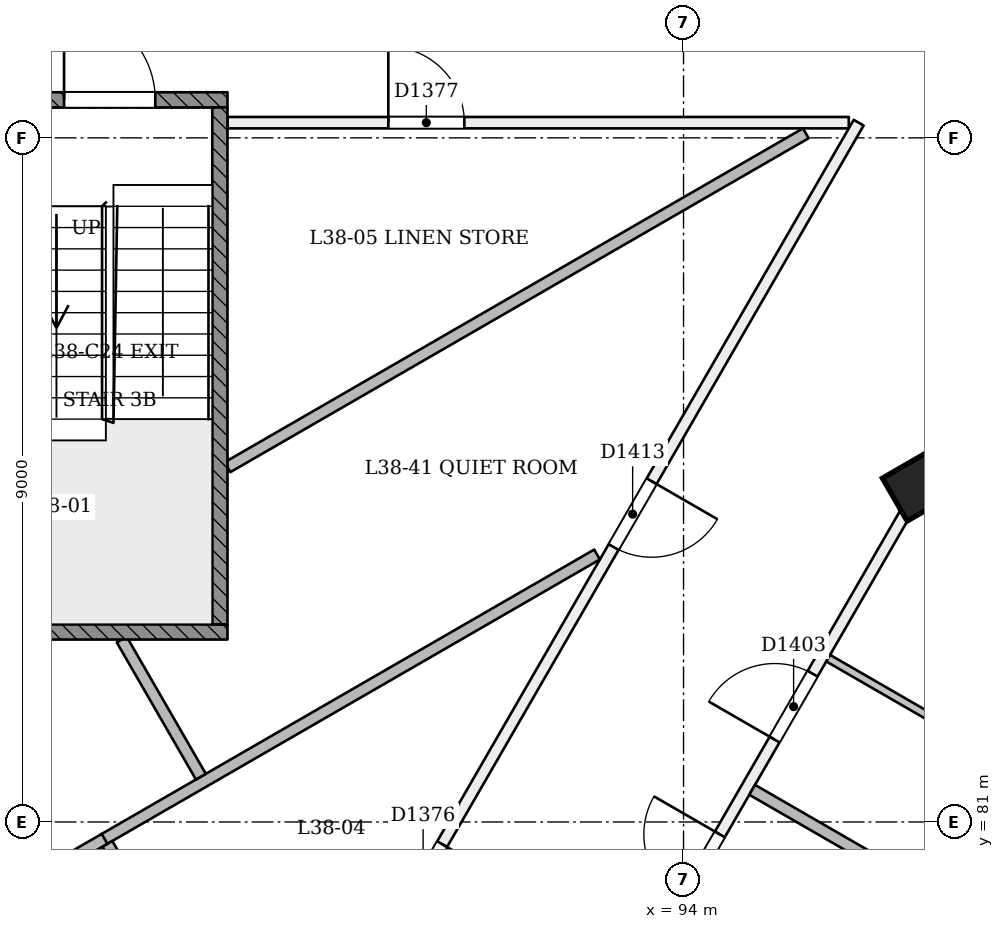
"""IFC4 building model, lengths in metres.
Left out: names, types, materials, properties, quantities, classifications, styles, units other than length and angle.
Written with IfcOpenShell. Run it as: python <this file> out.ifc"""

import sys

from ifc_helpers import new_model, si_unit, direction, frame, frame_2d, origin, origin_2d, place, context, subcontext, project, spatial, rectangle, extrude, element, fill, save


model = new_model("IFC4")
c1 = context("Model", 3, precision=1e-05, world=origin(), true_north=direction((0.0, 1.0)))
c2 = subcontext(c1, "Body", "Model", "MODEL_VIEW")
j1 = project(units=[si_unit("LENGTHUNIT", "METRE"), si_unit("PLANEANGLEUNIT", "RADIAN")], contexts=[c1])
p1 = place(None, origin())
s1 = spatial("IfcSite", under=j1, at=p1, CompositionType="ELEMENT")
p2 = place(p1, origin())
s2 = spatial("IfcBuilding", under=s1, at=p2, CompositionType="ELEMENT")
p3 = place(p2, frame((0.0, 0.0, 149.4)))
s3 = spatial("IfcBuildingStorey", under=s2, at=p3, CompositionType="ELEMENT", Elevation=149.4)
p4 = place(p3, frame((97.088, 85.357, -0.02), z_axis=(-0.022222910879, 0.038415824599, 0.999014697916), x_axis=(-0.499510298922, -0.86602370152, 0.022190305915)))
e1 = element("IfcColumn", 1, at=p4, inside=s3, PredefinedType="COLUMN", context=c2, shape_type="SweptSolid", body=[
    extrude(rectangle(XDim=0.65, YDim=0.65, at=origin_2d()), origin(), (0.0, 0.0, 1.0), 3.604),
])
p5 = place(p3, frame((88.0, 90.2, 0.0), z_axis=(0.0, 0.0, 1.0), x_axis=(1.0, 0.0, 0.0)))
e2 = element("IfcWall", 2, at=p5, inside=s3, PredefinedType="PARTITIONING", context=c2, shape_type="SweptSolid", body=[
    extrude(rectangle(XDim=8.174, YDim=0.15, at=frame_2d((4.087, 0.0))), origin(), (0.0, 0.0, 1.0), 3.15),
])
p6 = place(p5, frame((2.116, 0.0, 0.0)))
e3 = element("IfcOpeningElement", 3, at=p6, cuts=e2, PredefinedType="OPENING", context=c2, shape_type="SweptSolid", body=[
    extrude(rectangle(XDim=1.0, YDim=2.1, at=frame_2d((0.5, 1.05))), frame((0.0, 0.085, 0.0), z_axis=(0.0, -1.0, 0.0), x_axis=(1.0, 0.0, 0.0)), (0.0, 0.0, 1.0), 0.171),
])
p7 = place(p3, frame((96.304, 90.2, 0.0), z_axis=(0.0, 0.0, 1.0), x_axis=(-0.500004509943, -0.866022799952, 0.0)))
e4 = element("IfcWall", 4, at=p7, inside=s3, PredefinedType="PARTITIONING", context=c2, shape_type="SweptSolid", body=[
    extrude(rectangle(XDim=22.478, YDim=0.15, at=frame_2d((11.239, 0.0))), origin(), (0.0, 0.0, 1.0), 3.15),
])
p8 = place(p7, frame((10.96, 0.0, 0.0)))
e5 = element("IfcOpeningElement", 5, at=p8, cuts=e4, PredefinedType="OPENING", context=c2, shape_type="SweptSolid", body=[
    extrude(rectangle(XDim=1.0, YDim=2.1, at=frame_2d((0.5, 1.05))), frame((0.0, 0.085, 0.0), z_axis=(0.0, -1.0, 0.0), x_axis=(1.0, 0.0, 0.0)), (0.0, 0.0, 1.0), 0.171),
])
p9 = place(p7, frame((5.447, 0.0, 0.0)))
e6 = element("IfcOpeningElement", 6, at=p9, cuts=e4, PredefinedType="OPENING", context=c2, shape_type="SweptSolid", body=[
    extrude(rectangle(XDim=1.0, YDim=2.1, at=frame_2d((0.5, 1.05))), frame((0.0, 0.085, 0.0), z_axis=(0.0, -1.0, 0.0), x_axis=(1.0, 0.0, 0.0)), (0.0, 0.0, 1.0), 0.171),
])
p10 = place(p3, frame((85.065, 64.534, 0.0), z_axis=(0.0, 0.0, 1.0), x_axis=(0.500002644497, 0.866023876978, 0.0)))
e7 = element("IfcWall", 7, at=p10, inside=s3, PredefinedType="PARTITIONING", context=c2, shape_type="SweptSolid", body=[
    extrude(rectangle(XDim=39.221, YDim=0.15, at=frame_2d((19.61, 0.0))), origin(), (0.0, 0.0, 1.0), 2.75),
])
p11 = place(p10, frame((0.506, 0.0, 0.0)))
e8 = element("IfcOpeningElement", 8, at=p11, cuts=e7, PredefinedType="OPENING", context=c2, shape_type="SweptSolid", body=[
    extrude(rectangle(XDim=1.2, YDim=2.1, at=frame_2d((0.6, 1.05))), frame((0.0, 0.085, 0.0), z_axis=(0.0, -1.0, 0.0), x_axis=(1.0, 0.0, 0.0)), (0.0, 0.0, 1.0), 0.171),
])
p12 = place(p10, frame((8.825, 0.0, 0.0)))
e9 = element("IfcOpeningElement", 9, at=p12, cuts=e7, PredefinedType="OPENING", context=c2, shape_type="SweptSolid", body=[
    extrude(rectangle(XDim=1.0, YDim=2.1, at=frame_2d((0.5, 1.05))), frame((0.0, 0.085, 0.0), z_axis=(0.0, -1.0, 0.0), x_axis=(1.0, 0.0, 0.0)), (0.0, 0.0, 1.0), 0.171),
])
p13 = place(p10, frame((11.266, 0.0, 0.0)))
e10 = element("IfcOpeningElement", 10, at=p13, cuts=e7, PredefinedType="OPENING", context=c2, shape_type="SweptSolid", body=[
    extrude(rectangle(XDim=1.0, YDim=2.1, at=frame_2d((0.5, 1.05))), frame((0.0, 0.085, 0.0), z_axis=(0.0, -1.0, 0.0), x_axis=(1.0, 0.0, 0.0)), (0.0, 0.0, 1.0), 0.171),
])
p14 = place(p10, frame((17.825, 0.0, 0.0)))
e11 = element("IfcOpeningElement", 11, at=p14, cuts=e7, PredefinedType="OPENING", context=c2, shape_type="SweptSolid", body=[
    extrude(rectangle(XDim=1.0, YDim=2.1, at=frame_2d((0.5, 1.05))), frame((0.0, 0.085, 0.0), z_axis=(0.0, -1.0, 0.0), x_axis=(1.0, 0.0, 0.0)), (0.0, 0.0, 1.0), 0.171),
])
p15 = place(p10, frame((20.266, 0.0, 0.0)))
e12 = element("IfcOpeningElement", 12, at=p15, cuts=e7, PredefinedType="OPENING", context=c2, shape_type="SweptSolid", body=[
    extrude(rectangle(XDim=1.0, YDim=2.1, at=frame_2d((0.5, 1.05))), frame((0.0, 0.085, 0.0), z_axis=(0.0, -1.0, 0.0), x_axis=(1.0, 0.0, 0.0)), (0.0, 0.0, 1.0), 0.171),
])
p16 = place(p10, frame((26.825, 0.0, 0.0)))
e13 = element("IfcOpeningElement", 13, at=p16, cuts=e7, PredefinedType="OPENING", context=c2, shape_type="SweptSolid", body=[
    extrude(rectangle(XDim=1.0, YDim=2.1, at=frame_2d((0.5, 1.05))), frame((0.0, 0.085, 0.0), z_axis=(0.0, -1.0, 0.0), x_axis=(1.0, 0.0, 0.0)), (0.0, 0.0, 1.0), 0.171),
])
p17 = place(p10, frame((30.296, 0.0, 0.0)))
e14 = element("IfcOpeningElement", 14, at=p17, cuts=e7, PredefinedType="OPENING", context=c2, shape_type="SweptSolid", body=[
    extrude(rectangle(XDim=1.0, YDim=2.1, at=frame_2d((0.5, 1.05))), frame((0.0, 0.085, 0.0), z_axis=(0.0, -1.0, 0.0), x_axis=(1.0, 0.0, 0.0)), (0.0, 0.0, 1.0), 0.171),
])
p18 = place(p10, frame((35.875, 0.0, 0.0)))
e15 = element("IfcOpeningElement", 15, at=p18, cuts=e7, PredefinedType="OPENING", context=c2, shape_type="SweptSolid", body=[
    extrude(rectangle(XDim=1.1, YDim=2.1, at=frame_2d((0.55, 1.05))), frame((0.0, 0.085, 0.0), z_axis=(0.0, -1.0, 0.0), x_axis=(1.0, 0.0, 0.0)), (0.0, 0.0, 1.0), 0.171),
])
p19 = place(p10, frame((37.821, 0.0, 0.0)))
e16 = element("IfcOpeningElement", 16, at=p19, cuts=e7, PredefinedType="OPENING", context=c2, shape_type="SweptSolid", body=[
    extrude(rectangle(XDim=1.2, YDim=2.1, at=frame_2d((0.6, 1.05))), frame((0.0, 0.085, 0.0), z_axis=(0.0, -1.0, 0.0), x_axis=(1.0, 0.0, 0.0)), (0.0, 0.0, 1.0), 0.171),
])
p20 = place(p3, frame((92.862, 84.519, 0.0), z_axis=(0.0, 0.0, 1.0), x_axis=(-0.866023543838, -0.500003221507, 0.0)))
e17 = element("IfcWall", 17, at=p20, inside=s3, PredefinedType="PARTITIONING", context=c2, shape_type="SweptSolid", body=[
    extrude(rectangle(XDim=7.502, YDim=0.15, at=frame_2d((3.751, 0.0))), origin(), (0.0, 0.0, 1.0), 3.15),
])
p21 = place(p3, frame((86.42, 80.713, 0.0), z_axis=(0.0, 0.0, 1.0), x_axis=(0.500010613097, -0.866019276224, 0.0)))
e18 = element("IfcWall", 18, at=p21, inside=s3, PredefinedType="PARTITIONING", context=c2, shape_type="SweptSolid", body=[
    extrude(rectangle(XDim=3.276, YDim=0.15, at=frame_2d((1.638, 0.0))), origin(), (0.0, 0.0, 1.0), 3.15),
])
p22 = place(p3, frame((88.0, 85.667, 0.0), z_axis=(0.0, 0.0, 1.0), x_axis=(0.86602686142, 0.499997475293, 0.0)))
e19 = element("IfcWall", 19, at=p22, inside=s3, PredefinedType="PARTITIONING", context=c2, shape_type="SweptSolid", body=[
    extrude(rectangle(XDim=8.786, YDim=0.15, at=frame_2d((4.393, 0.0))), origin(), (0.0, 0.0, 1.0), 3.15),
])
p23 = place(p3, frame((100.398, 78.25, 0.0), z_axis=(0.0, 0.0, 1.0), x_axis=(-0.866025401434, 0.500000004071, 0.0)))
e20 = element("IfcWall", 20, at=p23, inside=s3, PredefinedType="PARTITIONING", context=c2, shape_type="SweptSolid", body=[
    extrude(rectangle(XDim=6.345, YDim=0.15, at=frame_2d((3.173, 0.0))), origin(), (0.0, 0.0, 1.0), 2.65),
])
p24 = place(p3, frame((98.349, 81.743, 0.0), z_axis=(0.0, 0.0, 1.0), x_axis=(-0.866048868473, 0.499959355765, 0.0)))
e21 = element("IfcWall", 21, at=p24, inside=s3, PredefinedType="PARTITIONING", context=c2, shape_type="SweptSolid", body=[
    extrude(rectangle(XDim=2.825, YDim=0.1, at=frame_2d((1.413, 0.0))), origin(), (0.0, 0.0, 1.0), 3.15),
])
p25 = place(p3, frame((99.556, 83.933, 0.0), z_axis=(0.0, 0.0, 1.0), x_axis=(-0.866042014628, 0.499971228071, 0.0)))
e22 = element("IfcWall", 22, at=p25, inside=s3, PredefinedType="PARTITIONING", context=c2, shape_type="SweptSolid", body=[
    extrude(rectangle(XDim=2.775, YDim=0.1, at=frame_2d((1.388, 0.0))), origin(), (0.0, 0.0, 1.0), 2.75),
])
p26 = place(p3, frame((86.609, 83.4, 0.0), z_axis=(0.0, 0.0, 1.0), x_axis=(0.499996383721, -0.866027491634, 0.0)))
e23 = element("IfcWall", 23, at=p26, inside=s3, PredefinedType="PARTITIONING", context=c2, shape_type="SweptSolid", body=[
    extrude(rectangle(XDim=2.083, YDim=0.15, at=frame_2d((1.042, 0.0))), origin(), (0.0, 0.0, 1.0), 3.15),
])
p27 = place(p3, frame((81.013, 77.677, 0.0), z_axis=(0.0, 0.0, 1.0), x_axis=(0.866022320763, 0.500005339912, 0.0)))
e24 = element("IfcWall", 24, at=p27, inside=s3, PredefinedType="PARTITIONING", context=c2, shape_type="SweptSolid", body=[
    extrude(rectangle(XDim=6.201, YDim=0.15, at=frame_2d((3.1, 0.0))), origin(), (0.0, 0.0, 1.0), 3.15),
])
p28 = place(p3, frame((82.0, 90.5, 0.0), z_axis=(0.0, 0.0, 1.0), x_axis=(1.0, 0.0, 0.0)))
e25 = element("IfcWall", 25, at=p28, inside=s3, PredefinedType="SOLIDWALL", context=c2, shape_type="SweptSolid", body=[
    extrude(rectangle(XDim=6.0, YDim=0.2, at=frame_2d((3.0, 0.0))), origin(), (0.0, 0.0, 1.0), 3.15),
])
p29 = place(p28, frame((0.95, 0.0, 0.0)))
e26 = element("IfcOpeningElement", 26, at=p29, cuts=e25, PredefinedType="OPENING", context=c2, shape_type="SweptSolid", body=[
    extrude(rectangle(XDim=1.2, YDim=2.1, at=frame_2d((0.6, 1.05))), frame((0.0, 0.11, 0.0), z_axis=(0.0, -1.0, 0.0), x_axis=(1.0, 0.0, 0.0)), (0.0, 0.0, 1.0), 0.221),
])
p30 = place(p28, frame((3.85, 0.0, 0.0)))
e27 = element("IfcOpeningElement", 27, at=p30, cuts=e25, PredefinedType="OPENING", context=c2, shape_type="SweptSolid", body=[
    extrude(rectangle(XDim=1.2, YDim=2.1, at=frame_2d((0.6, 1.05))), frame((0.0, 0.11, 0.0), z_axis=(0.0, -1.0, 0.0), x_axis=(1.0, 0.0, 0.0)), (0.0, 0.0, 1.0), 0.221),
])
p31 = place(p3, frame((82.0, 83.5, 0.0), z_axis=(0.0, 0.0, 1.0), x_axis=(1.0, 0.0, 0.0)))
e28 = element("IfcWall", 28, at=p31, inside=s3, PredefinedType="SOLIDWALL", context=c2, shape_type="SweptSolid", body=[
    extrude(rectangle(XDim=6.0, YDim=0.2, at=frame_2d((3.0, 0.0))), origin(), (0.0, 0.0, 1.0), 3.15),
])
p32 = place(p3, frame((87.9, 83.6, 0.0), z_axis=(0.0, 0.0, 1.0), x_axis=(0.0, 1.0, 0.0)))
e29 = element("IfcWall", 29, at=p32, inside=s3, PredefinedType="SOLIDWALL", context=c2, shape_type="SweptSolid", body=[
    extrude(rectangle(XDim=6.8, YDim=0.2, at=frame_2d((3.4, 0.0))), origin(), (0.0, 0.0, 1.0), 3.15),
])
p33 = place(p8, origin())
e30 = element("IfcDoor", 30, at=p33, inside=s3, OperationType="SINGLE_SWING_LEFT", PredefinedType="NOTDEFINED", context=c2, shape_type="SweptSolid", body=[
    extrude(rectangle(XDim=1.0, YDim=2.1, at=frame_2d((0.5, 1.05))), frame((0.0, 0.025, 0.0), z_axis=(0.0, -1.0, 0.0), x_axis=(1.0, 0.0, 0.0)), (0.0, 0.0, 1.0), 0.05),
])
fill(e5, e30)
p34 = place(p6, origin())
e31 = element("IfcDoor", 31, at=p34, inside=s3, OperationType="SINGLE_SWING_LEFT", PredefinedType="NOTDEFINED", context=c2, shape_type="SweptSolid", body=[
    extrude(rectangle(XDim=1.0, YDim=2.1, at=frame_2d((0.5, 1.05))), frame((0.0, 0.025, 0.0), z_axis=(0.0, -1.0, 0.0), x_axis=(1.0, 0.0, 0.0)), (0.0, 0.0, 1.0), 0.05),
])
fill(e3, e31)
p35 = place(p14, origin())
e32 = element("IfcDoor", 32, at=p35, inside=s3, OperationType="SINGLE_SWING_RIGHT", PredefinedType="NOTDEFINED", context=c2, shape_type="SweptSolid", body=[
    extrude(rectangle(XDim=1.0, YDim=2.1, at=frame_2d((0.5, 1.05))), frame((0.0, 0.025, 0.0), z_axis=(0.0, -1.0, 0.0), x_axis=(1.0, 0.0, 0.0)), (0.0, 0.0, 1.0), 0.05),
])
fill(e11, e32)
p36 = place(p15, origin())
e33 = element("IfcDoor", 33, at=p36, inside=s3, OperationType="SINGLE_SWING_LEFT", PredefinedType="NOTDEFINED", context=c2, shape_type="SweptSolid", body=[
    extrude(rectangle(XDim=1.0, YDim=2.1, at=frame_2d((0.5, 1.05))), frame((0.0, 0.025, 0.0), z_axis=(0.0, -1.0, 0.0), x_axis=(1.0, 0.0, 0.0)), (0.0, 0.0, 1.0), 0.05),
])
fill(e12, e33)
p37 = place(p9, origin())
e34 = element("IfcDoor", 34, at=p37, inside=s3, OperationType="SINGLE_SWING_LEFT", PredefinedType="NOTDEFINED", context=c2, shape_type="SweptSolid", body=[
    extrude(rectangle(XDim=1.0, YDim=2.1, at=frame_2d((0.5, 1.05))), frame((0.0, 0.025, 0.0), z_axis=(0.0, -1.0, 0.0), x_axis=(1.0, 0.0, 0.0)), (0.0, 0.0, 1.0), 0.05),
])
fill(e6, e34)
p38 = place(p30, origin())
e35 = element("IfcDoor", 35, at=p38, inside=s3, OperationType="SINGLE_SWING_LEFT", PredefinedType="NOTDEFINED", context=c2, shape_type="SweptSolid", body=[
    extrude(rectangle(XDim=1.2, YDim=2.1, at=frame_2d((0.6, 1.05))), frame((0.0, 0.025, 0.0), z_axis=(0.0, -1.0, 0.0), x_axis=(1.0, 0.0, 0.0)), (0.0, 0.0, 1.0), 0.05),
])
fill(e27, e35)
save(model, sys.argv[1])
